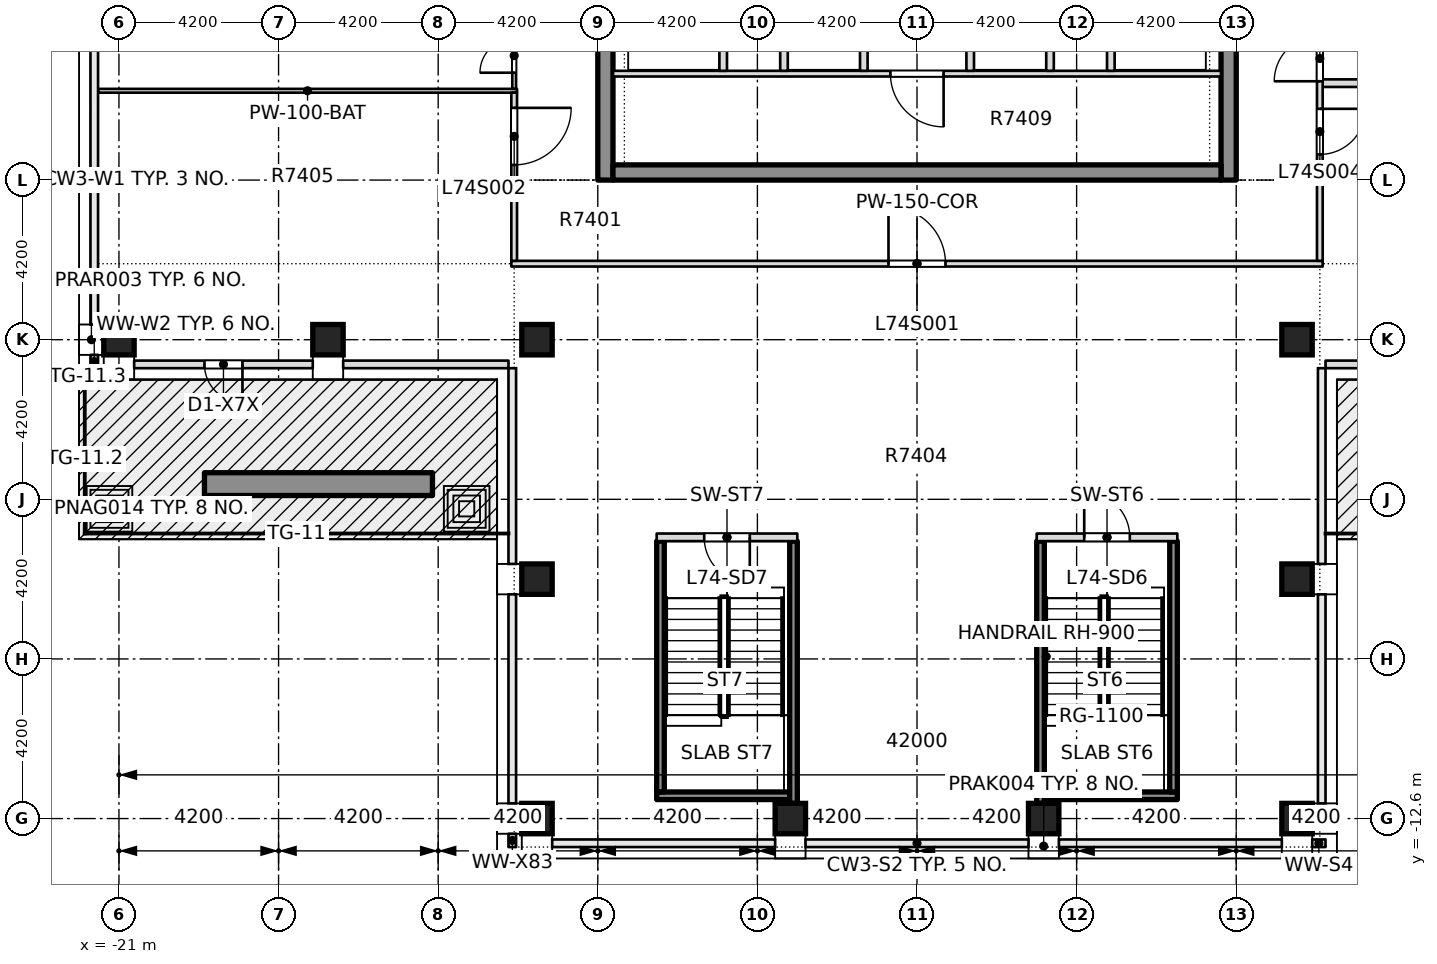
"""IFC4 building model, lengths in metres.
Left out: names, types, materials, properties, quantities, classifications, styles, units other than length and angle.
Written with IfcOpenShell. Run it as: python <this file> out.ifc"""

import sys

from ifc_helpers import new_model, si_unit, direction, frame, frame_2d, origin, origin_2d, place, context, subcontext, project, spatial, rectangle, extrude, element, fill, save


model = new_model("IFC4")
c1 = context("Model", 3, precision=1e-05, world=origin(), true_north=direction((0.0, 1.0)))
c2 = subcontext(c1, "Body", "Model", "MODEL_VIEW")
j1 = project(units=[si_unit("LENGTHUNIT", "METRE"), si_unit("PLANEANGLEUNIT", "RADIAN")], contexts=[c1])
p1 = place(None, origin())
s1 = spatial("IfcSite", under=j1, at=p1, CompositionType="ELEMENT")
p2 = place(p1, origin())
s2 = spatial("IfcBuilding", under=s1, at=p2, CompositionType="ELEMENT")
p3 = place(p2, frame((0.0, 0.0, 284.85)))
s3 = spatial("IfcBuildingStorey", under=s2, at=p3, CompositionType="ELEMENT", Elevation=284.85)
p4 = place(p3, frame((8.2, 4.2, -0.5), z_axis=(0.0, 0.0, 1.0), x_axis=(0.0, 1.0, 0.0)))
e1 = element("IfcWall", 1, at=p4, inside=s3, PredefinedType="SHEAR", context=c2, shape_type="SweptSolid", body=[
    extrude(rectangle(XDim=17.55, YDim=0.4, at=frame_2d((8.775, 0.0))), origin(), (0.0, 0.0, 1.0), 4.5),
])
p5 = place(p4, frame((6.7, 0.0, 0.5)))
e2 = element("IfcOpeningElement", 2, at=p5, cuts=e1, PredefinedType="OPENING", context=c2, shape_type="SweptSolid", body=[
    extrude(rectangle(XDim=1.2, YDim=2.1, at=frame_2d((0.6, 1.05))), frame((0.0, 0.21, 0.0), z_axis=(0.0, -1.0, 0.0), x_axis=(1.0, 0.0, 0.0)), (0.0, 0.0, 1.0), 0.42),
])
p6 = place(p3, frame((-8.2, 4.2, -0.5), z_axis=(0.0, 0.0, 1.0), x_axis=(0.0, 1.0, 0.0)))
e3 = element("IfcWall", 3, at=p6, inside=s3, PredefinedType="SHEAR", context=c2, shape_type="SweptSolid", body=[
    extrude(rectangle(XDim=17.55, YDim=0.4, at=frame_2d((8.775, 0.0))), origin(), (0.0, 0.0, 1.0), 4.5),
])
p7 = place(p6, frame((6.7, 0.0, 0.5)))
e4 = element("IfcOpeningElement", 4, at=p7, cuts=e3, PredefinedType="OPENING", context=c2, shape_type="SweptSolid", body=[
    extrude(rectangle(XDim=1.2, YDim=2.1, at=frame_2d((0.6, 1.05))), frame((0.0, 0.21, 0.0), z_axis=(0.0, -1.0, 0.0), x_axis=(1.0, 0.0, 0.0)), (0.0, 0.0, 1.0), 0.42),
])
p8 = place(p3, frame((-8.0, 4.4, -0.5), z_axis=(0.0, 0.0, 1.0), x_axis=(1.0, 0.0, 0.0)))
e5 = element("IfcWall", 5, at=p8, inside=s3, PredefinedType="SHEAR", context=c2, shape_type="SweptSolid", body=[
    extrude(rectangle(XDim=16.0, YDim=0.4, at=frame_2d((8.0, 0.0))), origin(), (0.0, 0.0, 1.0), 4.5),
])
for number, where, z_axis, x_axis in (
    (6, (-10.0, -12.6, -0.5), (0.0, 0.0, 1.0), (1.0, 0.0, 0.0)),
    (7, (-3.333, -12.6, -0.5), (0.0, 0.0, 1.0), (1.0, 0.0, 0.0)),
    (8, (3.333, -12.6, -0.5), (0.0, 0.0, 1.0), (1.0, 0.0, 0.0)),
    (9, (10.0, -12.6, -0.5), (0.0, 0.0, 1.0), (1.0, 0.0, 0.0)),
    (10, (-10.0, -6.3, -0.5), (0.0, 0.0, 1.0), (1.0, 0.0, 0.0)),
    (11, (10.0, -6.3, -0.5), (0.0, 0.0, 1.0), (1.0, 0.0, 0.0)),
    (12, (-21.0, 0.0, -0.5), (0.0, 0.0, 1.0), (1.0, 0.0, 0.0)),
    (13, (-15.5, 0.0, -0.5), (0.0, 0.0, 1.0), (1.0, 0.0, 0.0)),
    (14, (-10.0, 0.0, -0.5), (0.0, 0.0, 1.0), (1.0, 0.0, 0.0)),
    (15, (10.0, 0.0, -0.5), (0.0, 0.0, 1.0), (1.0, 0.0, 0.0)),
):
    element("IfcColumn", number, at=place(p3, frame(where, z_axis=z_axis, x_axis=x_axis)), inside=s3, PredefinedType="COLUMN", context=c2, shape_type="SweptSolid", body=[
        extrude(rectangle(XDim=0.8, YDim=0.8, at=origin_2d()), origin(), (0.0, 0.0, 1.0), 4.5),
    ])
p9 = place(p3, frame((-10.675, 2.0, 0.0), z_axis=(0.0, 0.0, 1.0), x_axis=(1.0, 0.0, 0.0)))
e16 = element("IfcWall", 16, at=p9, inside=s3, PredefinedType="PARTITIONING", context=c2, shape_type="SweptSolid", body=[
    extrude(rectangle(XDim=21.35, YDim=0.15, at=frame_2d((10.675, 0.0))), origin(), (0.0, 0.0, 1.0), 4.0),
])
p10 = place(p9, frame((9.925, 0.0, 0.0)))
e17 = element("IfcOpeningElement", 17, at=p10, cuts=e16, PredefinedType="OPENING", context=c2, shape_type="SweptSolid", body=[
    extrude(rectangle(XDim=1.5, YDim=2.1, at=frame_2d((0.75, 1.05))), frame((0.0, 0.085, 0.0), z_axis=(0.0, -1.0, 0.0), x_axis=(1.0, 0.0, 0.0)), (0.0, 0.0, 1.0), 0.17),
])
p11 = place(p3, frame((-21.55, 6.55, 0.0), z_axis=(0.0, 0.0, 1.0), x_axis=(1.0, 0.0, 0.0)))
e18 = element("IfcWall", 18, at=p11, inside=s3, PredefinedType="PARTITIONING", context=c2, shape_type="SweptSolid", body=[
    extrude(rectangle(XDim=11.025, YDim=0.1, at=frame_2d((5.513, 0.0))), origin(), (0.0, 0.0, 1.0), 4.0),
])
p12 = place(p3, frame((10.675, 6.75, 0.0), z_axis=(0.0, 0.0, 1.0), x_axis=(1.0, 0.0, 0.0)))
e19 = element("IfcWall", 19, at=p12, inside=s3, PredefinedType="PARTITIONING", context=c2, shape_type="SweptSolid", body=[
    extrude(rectangle(XDim=10.875, YDim=0.2, at=frame_2d((5.438, 0.0))), origin(), (0.0, 0.0, 1.0), 4.0),
])
p13 = place(p3, frame((-10.6, 2.075, 0.0), z_axis=(0.0, 0.0, 1.0), x_axis=(0.0, 1.0, 0.0)))
e20 = element("IfcWall", 20, at=p13, inside=s3, PredefinedType="PARTITIONING", context=c2, shape_type="SweptSolid", body=[
    extrude(rectangle(XDim=4.425, YDim=0.15, at=frame_2d((2.212, 0.0))), origin(), (0.0, 0.0, 1.0), 4.0),
])
p14 = place(p13, frame((2.525, 0.0, 0.0)))
e21 = element("IfcOpeningElement", 21, at=p14, cuts=e20, PredefinedType="OPENING", context=c2, shape_type="SweptSolid", body=[
    extrude(rectangle(XDim=1.5, YDim=2.1, at=frame_2d((0.75, 1.05))), frame((0.0, 0.085, 0.0), z_axis=(0.0, -1.0, 0.0), x_axis=(1.0, 0.0, 0.0)), (0.0, 0.0, 1.0), 0.17),
])
p15 = place(p3, frame((-10.6, 6.6, 0.0), z_axis=(0.0, 0.0, 1.0), x_axis=(0.0, 1.0, 0.0)))
e22 = element("IfcWall", 22, at=p15, inside=s3, PredefinedType="PARTITIONING", context=c2, shape_type="SweptSolid", body=[
    extrude(rectangle(XDim=2.55, YDim=0.1, at=frame_2d((1.275, 0.0))), origin(), (0.0, 0.0, 1.0), 4.0),
])
p16 = place(p15, frame((0.425, 0.0, 0.0)))
e23 = element("IfcOpeningElement", 23, at=p16, cuts=e22, PredefinedType="OPENING", context=c2, shape_type="SweptSolid", body=[
    extrude(rectangle(XDim=0.9, YDim=2.1, at=frame_2d((0.45, 1.05))), frame((0.0, 0.06, 0.0), z_axis=(0.0, -1.0, 0.0), x_axis=(1.0, 0.0, 0.0)), (0.0, 0.0, 1.0), 0.12),
])
p17 = place(p3, frame((10.6, 2.075, 0.0), z_axis=(0.0, 0.0, 1.0), x_axis=(0.0, 1.0, 0.0)))
e24 = element("IfcWall", 24, at=p17, inside=s3, PredefinedType="PARTITIONING", context=c2, shape_type="SweptSolid", body=[
    extrude(rectangle(XDim=7.075, YDim=0.15, at=frame_2d((3.538, 0.0))), origin(), (0.0, 0.0, 1.0), 4.0),
])
p18 = place(p17, frame((2.8, 0.0, 0.0)))
e25 = element("IfcOpeningElement", 25, at=p18, cuts=e24, PredefinedType="OPENING", context=c2, shape_type="SweptSolid", body=[
    extrude(rectangle(XDim=1.2, YDim=2.1, at=frame_2d((0.6, 1.05))), frame((0.0, 0.085, 0.0), z_axis=(0.0, -1.0, 0.0), x_axis=(1.0, 0.0, 0.0)), (0.0, 0.0, 1.0), 0.17),
])
p19 = place(p17, frame((4.725, 0.0, 0.0)))
e26 = element("IfcOpeningElement", 26, at=p19, cuts=e24, PredefinedType="OPENING", context=c2, shape_type="SweptSolid", body=[
    extrude(rectangle(XDim=1.2, YDim=2.1, at=frame_2d((0.6, 1.05))), frame((0.0, 0.085, 0.0), z_axis=(0.0, -1.0, 0.0), x_axis=(1.0, 0.0, 0.0)), (0.0, 0.0, 1.0), 0.17),
])
p20 = place(p3, frame((-12.75, -3.8, 0.0), z_axis=(0.0, 0.0, 1.0), x_axis=(-1.0, 0.0, 0.0)))
e27 = element("IfcWall", 27, at=p20, inside=s3, PredefinedType="USERDEFINED", context=c2, shape_type="SweptSolid", body=[
    extrude(rectangle(XDim=6.0, YDim=0.6, at=frame_2d((3.0, 0.0))), origin(), (0.0, 0.0, 1.0), 1.0),
])
p21 = place(p3, frame((10.4, -13.25, 0.0), z_axis=(0.0, 0.0, 1.0), x_axis=(1.0, 0.0, 0.0)))
e28 = element("IfcWall", 28, at=p21, inside=s3, PredefinedType="STANDARD", context=c2, shape_type="SweptSolid", body=[
    extrude(rectangle(XDim=0.35, YDim=0.2, at=frame_2d((0.175, 0.0))), origin(), (0.0, 0.0, 1.0), 4.0),
])
p22 = place(p3, frame((10.75, -0.65, 0.0), z_axis=(0.0, 0.0, 1.0), x_axis=(1.0, 0.0, 0.0)))
e29 = element("IfcWall", 29, at=p22, inside=s3, PredefinedType="STANDARD", context=c2, shape_type="SweptSolid", body=[
    extrude(rectangle(XDim=4.35, YDim=0.2, at=frame_2d((2.175, 0.0))), origin(), (0.0, 0.0, 1.0), 4.0),
])
p23 = place(p3, frame((-21.65, -0.4, 0.0), z_axis=(0.0, 0.0, 1.0), x_axis=(0.0, -1.0, 0.0)))
e30 = element("IfcWall", 30, at=p23, inside=s3, PredefinedType="STANDARD", context=c2, shape_type="SweptSolid", body=[
    extrude(rectangle(XDim=0.35, YDim=0.2, at=frame_2d((0.175, 0.0))), origin(), (0.0, 0.0, 1.0), 4.0),
])
p24 = place(p3, frame((-20.6, -0.65, 0.0), z_axis=(0.0, 0.0, 1.0), x_axis=(1.0, 0.0, 0.0)))
e31 = element("IfcWall", 31, at=p24, inside=s3, PredefinedType="STANDARD", context=c2, shape_type="SweptSolid", body=[
    extrude(rectangle(XDim=4.7, YDim=0.2, at=frame_2d((2.35, 0.0))), origin(), (0.0, 0.0, 1.0), 4.0),
])
p25 = place(p24, frame((1.85, 0.0, 0.0)))
e32 = element("IfcOpeningElement", 32, at=p25, cuts=e31, PredefinedType="OPENING", context=c2, shape_type="SweptSolid", body=[
    extrude(rectangle(XDim=1.0, YDim=2.4, at=frame_2d((0.5, 1.2))), frame((0.0, 0.11, 0.0), z_axis=(0.0, -1.0, 0.0), x_axis=(1.0, 0.0, 0.0)), (0.0, 0.0, 1.0), 0.22),
])
p26 = place(p3, frame((-15.1, -0.65, 0.0), z_axis=(0.0, 0.0, 1.0), x_axis=(1.0, 0.0, 0.0)))
e33 = element("IfcWall", 33, at=p26, inside=s3, PredefinedType="STANDARD", context=c2, shape_type="SweptSolid", body=[
    extrude(rectangle(XDim=4.35, YDim=0.2, at=frame_2d((2.175, 0.0))), origin(), (0.0, 0.0, 1.0), 4.0),
])
p27 = place(p3, frame((-10.65, -13.0, 0.0), z_axis=(0.0, 0.0, 1.0), x_axis=(0.0, -1.0, 0.0)))
e34 = element("IfcWall", 34, at=p27, inside=s3, PredefinedType="STANDARD", context=c2, shape_type="SweptSolid", body=[
    extrude(rectangle(XDim=0.35, YDim=0.2, at=frame_2d((0.175, 0.0))), origin(), (0.0, 0.0, 1.0), 4.0),
])
p28 = place(p3, frame((-7.999, 7.0, 0.0), z_axis=(0.0, 0.0, 1.0), x_axis=(1.0, 0.0, 0.0)))
e35 = element("IfcWall", 35, at=p28, inside=s3, PredefinedType="PARTITIONING", context=c2, shape_type="SweptSolid", body=[
    extrude(rectangle(XDim=15.998, YDim=0.15, at=frame_2d((7.999, 0.0))), origin(), (0.0, 0.0, 1.0), 4.0),
])
p29 = place(p28, frame((7.299, 0.0, 0.0)))
e36 = element("IfcOpeningElement", 36, at=p29, cuts=e35, PredefinedType="OPENING", context=c2, shape_type="SweptSolid", body=[
    extrude(rectangle(XDim=1.4, YDim=2.1, at=frame_2d((0.7, 1.05))), frame((0.0, 0.085, 0.0), z_axis=(0.0, -1.0, 0.0), x_axis=(1.0, 0.0, 0.0)), (0.0, 0.0, 1.0), 0.17),
])
p30 = place(p3, frame((-5.1, 7.075, 0.0), z_axis=(0.0, 0.0, 1.0), x_axis=(0.0, 1.0, 0.0)))
e37 = element("IfcWall", 37, at=p30, inside=s3, PredefinedType="PARTITIONING", context=c2, shape_type="SweptSolid", body=[
    extrude(rectangle(XDim=2.725, YDim=0.2, at=frame_2d((1.363, 0.0))), origin(), (0.0, 0.0, 1.0), 4.0),
])
p31 = place(p3, frame((-3.5, 7.075, 0.0), z_axis=(0.0, 0.0, 1.0), x_axis=(0.0, 1.0, 0.0)))
e38 = element("IfcWall", 38, at=p31, inside=s3, PredefinedType="PARTITIONING", context=c2, shape_type="SweptSolid", body=[
    extrude(rectangle(XDim=2.85, YDim=0.2, at=frame_2d((1.425, 0.0))), origin(), (0.0, 0.0, 1.0), 4.0),
])
p32 = place(p3, frame((-1.4, 7.075, 0.0), z_axis=(0.0, 0.0, 1.0), x_axis=(0.0, 1.0, 0.0)))
e39 = element("IfcWall", 39, at=p32, inside=s3, PredefinedType="PARTITIONING", context=c2, shape_type="SweptSolid", body=[
    extrude(rectangle(XDim=2.85, YDim=0.2, at=frame_2d((1.425, 0.0))), origin(), (0.0, 0.0, 1.0), 4.0),
])
p33 = place(p32, frame((0.875, 0.0, 0.0)))
e40 = element("IfcOpeningElement", 40, at=p33, cuts=e39, PredefinedType="OPENING", context=c2, shape_type="SweptSolid", body=[
    extrude(rectangle(XDim=1.1, YDim=2.1, at=frame_2d((0.55, 1.05))), frame((0.0, 0.11, 0.0), z_axis=(0.0, -1.0, 0.0), x_axis=(1.0, 0.0, 0.0)), (0.0, 0.0, 1.0), 0.22),
])
p34 = place(p3, frame((1.4, 7.075, 0.0), z_axis=(0.0, 0.0, 1.0), x_axis=(0.0, 1.0, 0.0)))
e41 = element("IfcWall", 41, at=p34, inside=s3, PredefinedType="PARTITIONING", context=c2, shape_type="SweptSolid", body=[
    extrude(rectangle(XDim=2.85, YDim=0.2, at=frame_2d((1.425, 0.0))), origin(), (0.0, 0.0, 1.0), 4.0),
])
p35 = place(p34, frame((0.875, 0.0, 0.0)))
e42 = element("IfcOpeningElement", 42, at=p35, cuts=e41, PredefinedType="OPENING", context=c2, shape_type="SweptSolid", body=[
    extrude(rectangle(XDim=1.1, YDim=2.1, at=frame_2d((0.55, 1.05))), frame((0.0, 0.11, 0.0), z_axis=(0.0, -1.0, 0.0), x_axis=(1.0, 0.0, 0.0)), (0.0, 0.0, 1.0), 0.22),
])
p36 = place(p3, frame((3.5, 7.075, 0.0), z_axis=(0.0, 0.0, 1.0), x_axis=(0.0, 1.0, 0.0)))
e43 = element("IfcWall", 43, at=p36, inside=s3, PredefinedType="PARTITIONING", context=c2, shape_type="SweptSolid", body=[
    extrude(rectangle(XDim=2.85, YDim=0.2, at=frame_2d((1.425, 0.0))), origin(), (0.0, 0.0, 1.0), 4.0),
])
p37 = place(p3, frame((5.1, 7.075, 0.0), z_axis=(0.0, 0.0, 1.0), x_axis=(0.0, 1.0, 0.0)))
e44 = element("IfcWall", 44, at=p37, inside=s3, PredefinedType="PARTITIONING", context=c2, shape_type="SweptSolid", body=[
    extrude(rectangle(XDim=2.725, YDim=0.2, at=frame_2d((1.363, 0.0))), origin(), (0.0, 0.0, 1.0), 4.0),
])
p38 = place(p3, frame((3.15, -12.0, 0.0), z_axis=(0.0, 0.0, 1.0), x_axis=(1.0, 0.0, 0.0)))
e45 = element("IfcWall", 45, at=p38, inside=s3, PredefinedType="SOLIDWALL", context=c2, shape_type="SweptSolid", body=[
    extrude(rectangle(XDim=3.7, YDim=0.2, at=frame_2d((1.85, 0.0))), origin(), (0.0, 0.0, 1.0), 4.0),
])
p39 = place(p3, frame((3.15, -5.2, 0.0), z_axis=(0.0, 0.0, 1.0), x_axis=(1.0, 0.0, 0.0)))
e46 = element("IfcWall", 46, at=p39, inside=s3, PredefinedType="PARTITIONING", context=c2, shape_type="SweptSolid", body=[
    extrude(rectangle(XDim=3.7, YDim=0.2, at=frame_2d((1.85, 0.0))), origin(), (0.0, 0.0, 1.0), 4.0),
])
p40 = place(p39, frame((1.25, 0.0, 0.0)))
e47 = element("IfcOpeningElement", 47, at=p40, cuts=e46, PredefinedType="OPENING", context=c2, shape_type="SweptSolid", body=[
    extrude(rectangle(XDim=1.2, YDim=2.1, at=frame_2d((0.6, 1.05))), frame((0.0, 0.11, 0.0), z_axis=(0.0, -1.0, 0.0), x_axis=(1.0, 0.0, 0.0)), (0.0, 0.0, 1.0), 0.22),
])
p41 = place(p3, frame((3.25, -12.2, 0.0), z_axis=(0.0, 0.0, 1.0), x_axis=(0.0, 1.0, 0.0)))
e48 = element("IfcWall", 48, at=p41, inside=s3, PredefinedType="SOLIDWALL", context=c2, shape_type="SweptSolid", body=[
    extrude(rectangle(XDim=6.9, YDim=0.2, at=frame_2d((3.45, 0.0))), origin(), (0.0, 0.0, 1.0), 4.0),
])
p42 = place(p3, frame((6.75, -11.9, 0.0), z_axis=(0.0, 0.0, 1.0), x_axis=(0.0, 1.0, 0.0)))
e49 = element("IfcWall", 49, at=p42, inside=s3, PredefinedType="SOLIDWALL", context=c2, shape_type="SweptSolid", body=[
    extrude(rectangle(XDim=6.6, YDim=0.2, at=frame_2d((3.3, 0.0))), origin(), (0.0, 0.0, 1.0), 4.0),
])
p43 = place(p3, frame((-6.85, -12.0, 0.0), z_axis=(0.0, 0.0, 1.0), x_axis=(1.0, 0.0, 0.0)))
e50 = element("IfcWall", 50, at=p43, inside=s3, PredefinedType="SOLIDWALL", context=c2, shape_type="SweptSolid", body=[
    extrude(rectangle(XDim=3.7, YDim=0.2, at=frame_2d((1.85, 0.0))), origin(), (0.0, 0.0, 1.0), 4.0),
])
p44 = place(p3, frame((-6.85, -5.2, 0.0), z_axis=(0.0, 0.0, 1.0), x_axis=(1.0, 0.0, 0.0)))
e51 = element("IfcWall", 51, at=p44, inside=s3, PredefinedType="PARTITIONING", context=c2, shape_type="SweptSolid", body=[
    extrude(rectangle(XDim=3.7, YDim=0.2, at=frame_2d((1.85, 0.0))), origin(), (0.0, 0.0, 1.0), 4.0),
])
p45 = place(p44, frame((1.25, 0.0, 0.0)))
e52 = element("IfcOpeningElement", 52, at=p45, cuts=e51, PredefinedType="OPENING", context=c2, shape_type="SweptSolid", body=[
    extrude(rectangle(XDim=1.2, YDim=2.1, at=frame_2d((0.6, 1.05))), frame((0.0, 0.11, 0.0), z_axis=(0.0, -1.0, 0.0), x_axis=(1.0, 0.0, 0.0)), (0.0, 0.0, 1.0), 0.22),
])
p46 = place(p3, frame((-6.75, -11.9, 0.0), z_axis=(0.0, 0.0, 1.0), x_axis=(0.0, 1.0, 0.0)))
e53 = element("IfcWall", 53, at=p46, inside=s3, PredefinedType="SOLIDWALL", context=c2, shape_type="SweptSolid", body=[
    extrude(rectangle(XDim=6.6, YDim=0.2, at=frame_2d((3.3, 0.0))), origin(), (0.0, 0.0, 1.0), 4.0),
])
p47 = place(p3, frame((-3.25, -12.2, 0.0), z_axis=(0.0, 0.0, 1.0), x_axis=(0.0, 1.0, 0.0)))
e54 = element("IfcWall", 54, at=p47, inside=s3, PredefinedType="SOLIDWALL", context=c2, shape_type="SweptSolid", body=[
    extrude(rectangle(XDim=6.9, YDim=0.2, at=frame_2d((3.45, 0.0))), origin(), (0.0, 0.0, 1.0), 4.0),
])
p48 = place(p10, origin())
e55 = element("IfcDoor", 55, at=p48, inside=s3, OperationType="DOUBLE_DOOR_SINGLE_SWING", PredefinedType="DOOR", context=c2, shape_type="SweptSolid", body=[
    extrude(rectangle(XDim=1.5, YDim=2.1, at=frame_2d((0.75, 1.05))), frame((0.0, 0.025, 0.0), z_axis=(0.0, -1.0, 0.0), x_axis=(1.0, 0.0, 0.0)), (0.0, 0.0, 1.0), 0.05),
])
fill(e17, e55)
p49 = place(p14, origin())
e56 = element("IfcDoor", 56, at=p49, inside=s3, OperationType="DOUBLE_DOOR_SINGLE_SWING", PredefinedType="DOOR", context=c2, shape_type="SweptSolid", body=[
    extrude(rectangle(XDim=1.5, YDim=2.1, at=frame_2d((0.75, 1.05))), frame((0.0, 0.025, 0.0), z_axis=(0.0, -1.0, 0.0), x_axis=(1.0, 0.0, 0.0)), (0.0, 0.0, 1.0), 0.05),
])
fill(e21, e56)
p50 = place(p16, origin())
e57 = element("IfcDoor", 57, at=p50, inside=s3, OperationType="SINGLE_SWING_LEFT", PredefinedType="DOOR", context=c2, shape_type="SweptSolid", body=[
    extrude(rectangle(XDim=0.9, YDim=2.1, at=frame_2d((0.45, 1.05))), frame((0.0, 0.025, 0.0), z_axis=(0.0, -1.0, 0.0), x_axis=(1.0, 0.0, 0.0)), (0.0, 0.0, 1.0), 0.05),
])
fill(e23, e57)
p51 = place(p18, origin())
e58 = element("IfcDoor", 58, at=p51, inside=s3, OperationType="SINGLE_SWING_LEFT", PredefinedType="DOOR", context=c2, shape_type="SweptSolid", body=[
    extrude(rectangle(XDim=1.2, YDim=2.1, at=frame_2d((0.6, 1.05))), frame((0.0, 0.025, 0.0), z_axis=(0.0, -1.0, 0.0), x_axis=(1.0, 0.0, 0.0)), (0.0, 0.0, 1.0), 0.05),
])
fill(e25, e58)
p52 = place(p19, origin())
e59 = element("IfcDoor", 59, at=p52, inside=s3, OperationType="SINGLE_SWING_RIGHT", PredefinedType="DOOR", context=c2, shape_type="SweptSolid", body=[
    extrude(rectangle(XDim=1.2, YDim=2.1, at=frame_2d((0.6, 1.05))), frame((0.0, 0.025, 0.0), z_axis=(0.0, -1.0, 0.0), x_axis=(1.0, 0.0, 0.0)), (0.0, 0.0, 1.0), 0.05),
])
fill(e26, e59)
p53 = place(p25, origin())
e60 = element("IfcDoor", 60, at=p53, inside=s3, OperationType="SINGLE_SWING_LEFT", PredefinedType="DOOR", context=c2, shape_type="SweptSolid", body=[
    extrude(rectangle(XDim=1.0, YDim=2.4, at=frame_2d((0.5, 1.2))), frame((0.0, 0.025, 0.0), z_axis=(0.0, -1.0, 0.0), x_axis=(1.0, 0.0, 0.0)), (0.0, 0.0, 1.0), 0.05),
])
fill(e32, e60)
p54 = place(p29, origin())
e61 = element("IfcDoor", 61, at=p54, inside=s3, OperationType="SINGLE_SWING_RIGHT", PredefinedType="DOOR", context=c2, shape_type="SweptSolid", body=[
    extrude(rectangle(XDim=1.4, YDim=2.1, at=frame_2d((0.7, 1.05))), frame((0.0, 0.025, 0.0), z_axis=(0.0, -1.0, 0.0), x_axis=(1.0, 0.0, 0.0)), (0.0, 0.0, 1.0), 0.05),
])
fill(e36, e61)
p55 = place(p40, origin())
e62 = element("IfcDoor", 62, at=p55, inside=s3, OperationType="SINGLE_SWING_LEFT", PredefinedType="DOOR", context=c2, shape_type="SweptSolid", body=[
    extrude(rectangle(XDim=1.2, YDim=2.1, at=frame_2d((0.6, 1.05))), frame((0.0, 0.025, 0.0), z_axis=(0.0, -1.0, 0.0), x_axis=(1.0, 0.0, 0.0)), (0.0, 0.0, 1.0), 0.05),
])
fill(e47, e62)
p56 = place(p45, origin())
e63 = element("IfcDoor", 63, at=p56, inside=s3, OperationType="SINGLE_SWING_LEFT", PredefinedType="DOOR", context=c2, shape_type="SweptSolid", body=[
    extrude(rectangle(XDim=1.2, YDim=2.1, at=frame_2d((0.6, 1.05))), frame((0.0, 0.025, 0.0), z_axis=(0.0, -1.0, 0.0), x_axis=(1.0, 0.0, 0.0)), (0.0, 0.0, 1.0), 0.05),
])
fill(e52, e63)
save(model, sys.argv[1])
